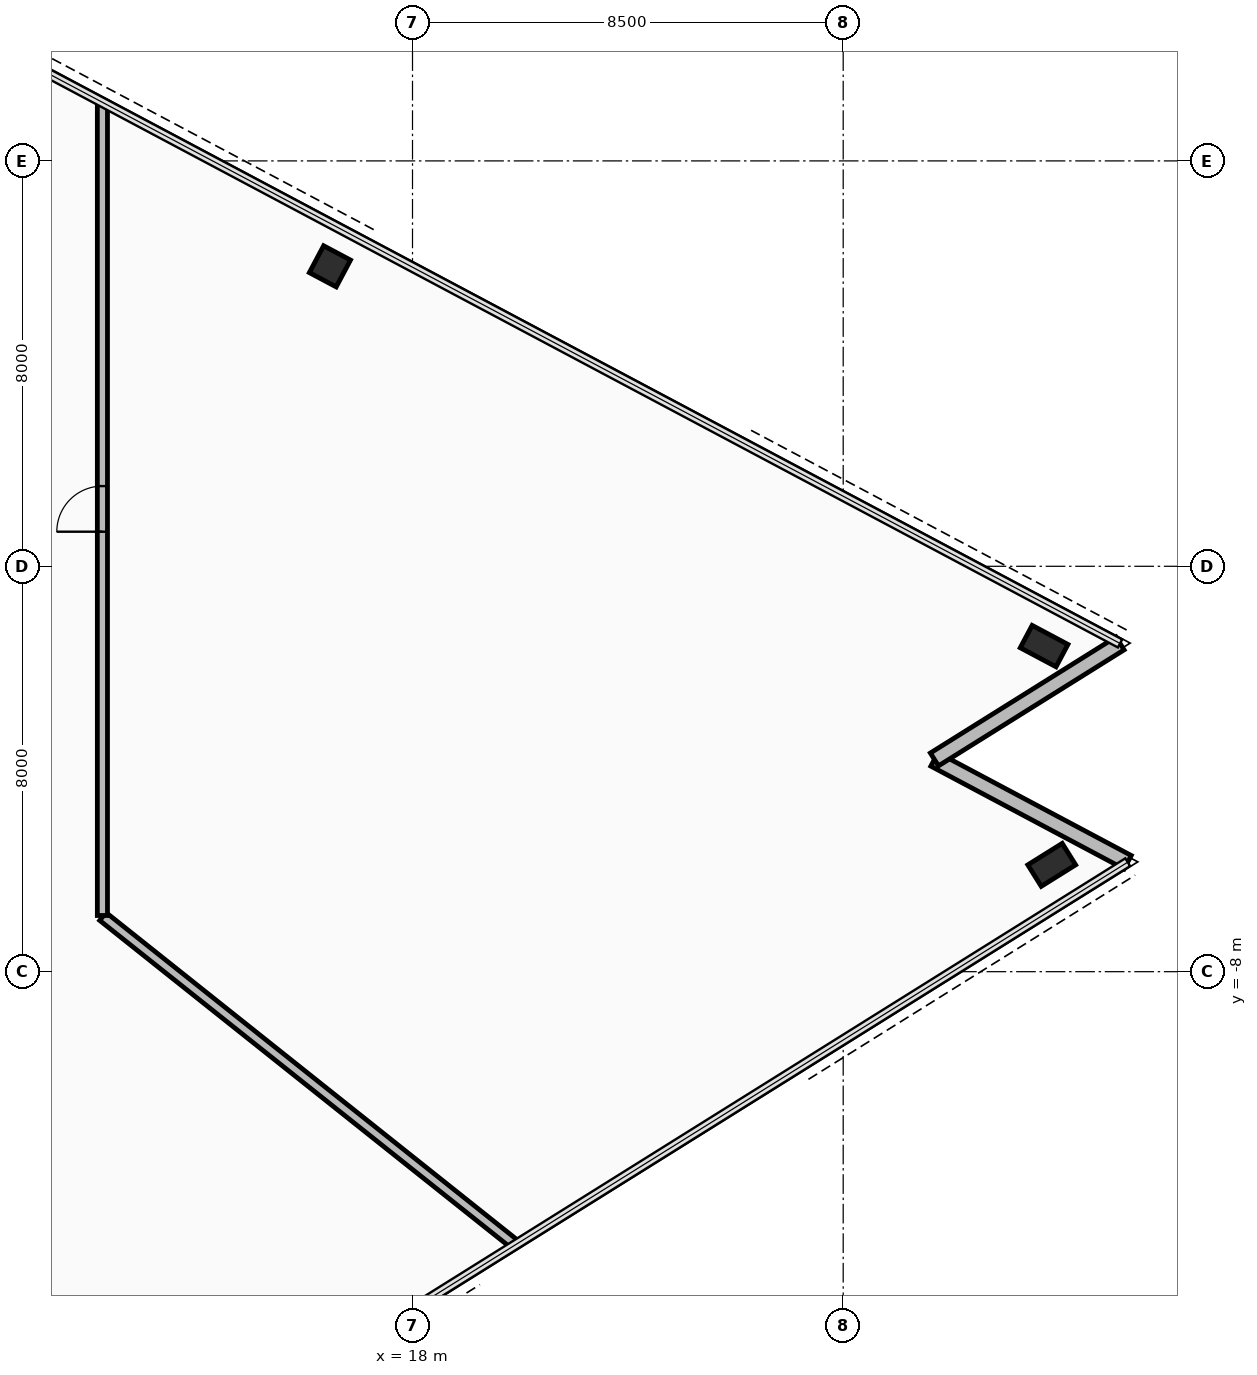
"""IFC4 building model, lengths in metres.
Left out: names, types, materials, properties, quantities, classifications, styles, units other than length and angle.
Written with IfcOpenShell. Run it as: python <this file> out.ifc"""

import sys

from ifc_helpers import new_model, si_unit, direction, frame, frame_2d, origin, origin_2d, place, context, subcontext, project, spatial, rectangle, hollow_rectangle, extrude, element, fill, save


model = new_model("IFC4")
c1 = context("Model", 3, precision=1e-05, world=origin(), true_north=direction((0.0, 1.0)))
c2 = subcontext(c1, "Body", "Model", "MODEL_VIEW")
j1 = project(units=[si_unit("LENGTHUNIT", "METRE"), si_unit("PLANEANGLEUNIT", "RADIAN")], contexts=[c1])
p1 = place(None, origin())
s1 = spatial("IfcSite", under=j1, at=p1, CompositionType="ELEMENT")
p2 = place(p1, origin())
s2 = spatial("IfcBuilding", under=s1, at=p2, CompositionType="ELEMENT")
p3 = place(p2, frame((0.0, 0.0, 153.2)))
s3 = spatial("IfcBuildingStorey", under=s2, at=p3, CompositionType="ELEMENT", Elevation=153.2)
for number, where, z_axis, x_axis in (
    (1, (30.615, -5.892, 0.0), (0.0, 0.0, 1.0), (0.848, 0.53, 0.0)),
    (2, (30.465, -1.575, 0.0), (0.0, 0.0, 1.0), (-0.883, 0.469, 0.0)),
):
    element("IfcColumn", number, at=place(p3, frame(where, z_axis=z_axis, x_axis=x_axis)), inside=s3, PredefinedType="COLUMN", context=c2, shape_type="SweptSolid", body=[
        extrude(hollow_rectangle(XDim=0.5, YDim=0.8, WallThickness=0.04, at=origin_2d()), origin(), (0.0, 0.0, 1.0), 3.6),
    ])
p4 = place(p3, frame((16.37, 5.919, 0.0), z_axis=(0.0, 0.0, 1.0), x_axis=(-0.88294841224, 0.469470021751, 0.0)))
e3 = element("IfcColumn", 3, at=p4, inside=s3, PredefinedType="COLUMN", context=c2, shape_type="SweptSolid", body=[
    extrude(hollow_rectangle(XDim=0.6, YDim=0.6, WallThickness=0.036, at=origin_2d()), origin(), (0.0, 0.0, 1.0), 3.6),
])
p5 = place(p3, frame((32.115, -5.84, 0.0), z_axis=(0.0, 0.0, 1.0), x_axis=(-0.882945167019, 0.469476125099, 0.0)))
e4 = element("IfcWall", 4, at=p5, inside=s3, PredefinedType="STANDARD", context=c2, shape_type="SweptSolid", body=[
    extrude(rectangle(XDim=4.32, YDim=0.3, at=frame_2d((2.16, 0.0))), origin(), (0.0, 0.0, 1.0), 2.705),
])
p6 = place(p3, frame((28.3, -3.812, 0.0), z_axis=(0.0, 0.0, 1.0), x_axis=(0.848042749904, 0.529927819929, 0.0)))
e5 = element("IfcWall", 5, at=p6, inside=s3, PredefinedType="STANDARD", context=c2, shape_type="SweptSolid", body=[
    extrude(rectangle(XDim=4.32, YDim=0.3, at=frame_2d((2.16, 0.0))), origin(), (0.0, 0.0, 1.0), 2.705),
])
p7 = place(p3, frame((20.03, -13.391, 0.0), z_axis=(0.0, 0.0, 1.0), x_axis=(-0.782379652936, 0.622801797261, 0.0)))
e6 = element("IfcWall", 6, at=p7, inside=s3, PredefinedType="PARTITIONING", context=c2, shape_type="SweptSolid", body=[
    extrude(rectangle(XDim=10.405, YDim=0.2, at=frame_2d((5.203, 0.0))), origin(), (0.0, 0.0, 1.0), 2.705),
])
p8 = place(p3, frame((11.88, -6.891, 0.0), z_axis=(0.0, 0.0, 1.0), x_axis=(0.0, 1.0, 0.0)))
e7 = element("IfcWall", 7, at=p8, inside=s3, PredefinedType="PARTITIONING", context=c2, shape_type="SweptSolid", body=[
    extrude(rectangle(XDim=16.048, YDim=0.2, at=frame_2d((8.024, 0.0))), origin(), (0.0, 0.0, 1.0), 2.705),
])
p9 = place(p8, frame((7.574, 0.0, 0.0)))
e8 = element("IfcOpeningElement", 8, at=p9, cuts=e7, PredefinedType="OPENING", context=c2, shape_type="SweptSolid", body=[
    extrude(rectangle(XDim=0.9, YDim=2.1, at=frame_2d((0.45, 1.05))), frame((0.0, 0.11, 0.0), z_axis=(0.0, -1.0, 0.0), x_axis=(1.0, 0.0, 0.0)), (0.0, 0.0, 1.0), 0.22),
])
p10 = place(p9, origin())
e9 = element("IfcDoor", 9, at=p10, inside=s3, OperationType="SINGLE_SWING_LEFT", PredefinedType="DOOR", context=c2, shape_type="SweptSolid", body=[
    extrude(rectangle(XDim=0.9, YDim=2.1, at=frame_2d((0.45, 1.05))), frame((0.0, 0.025, 0.0), z_axis=(0.0, -1.0, 0.0), x_axis=(1.0, 0.0, 0.0)), (0.0, 0.0, 1.0), 0.05),
])
fill(e8, e9)
save(model, sys.argv[1])
